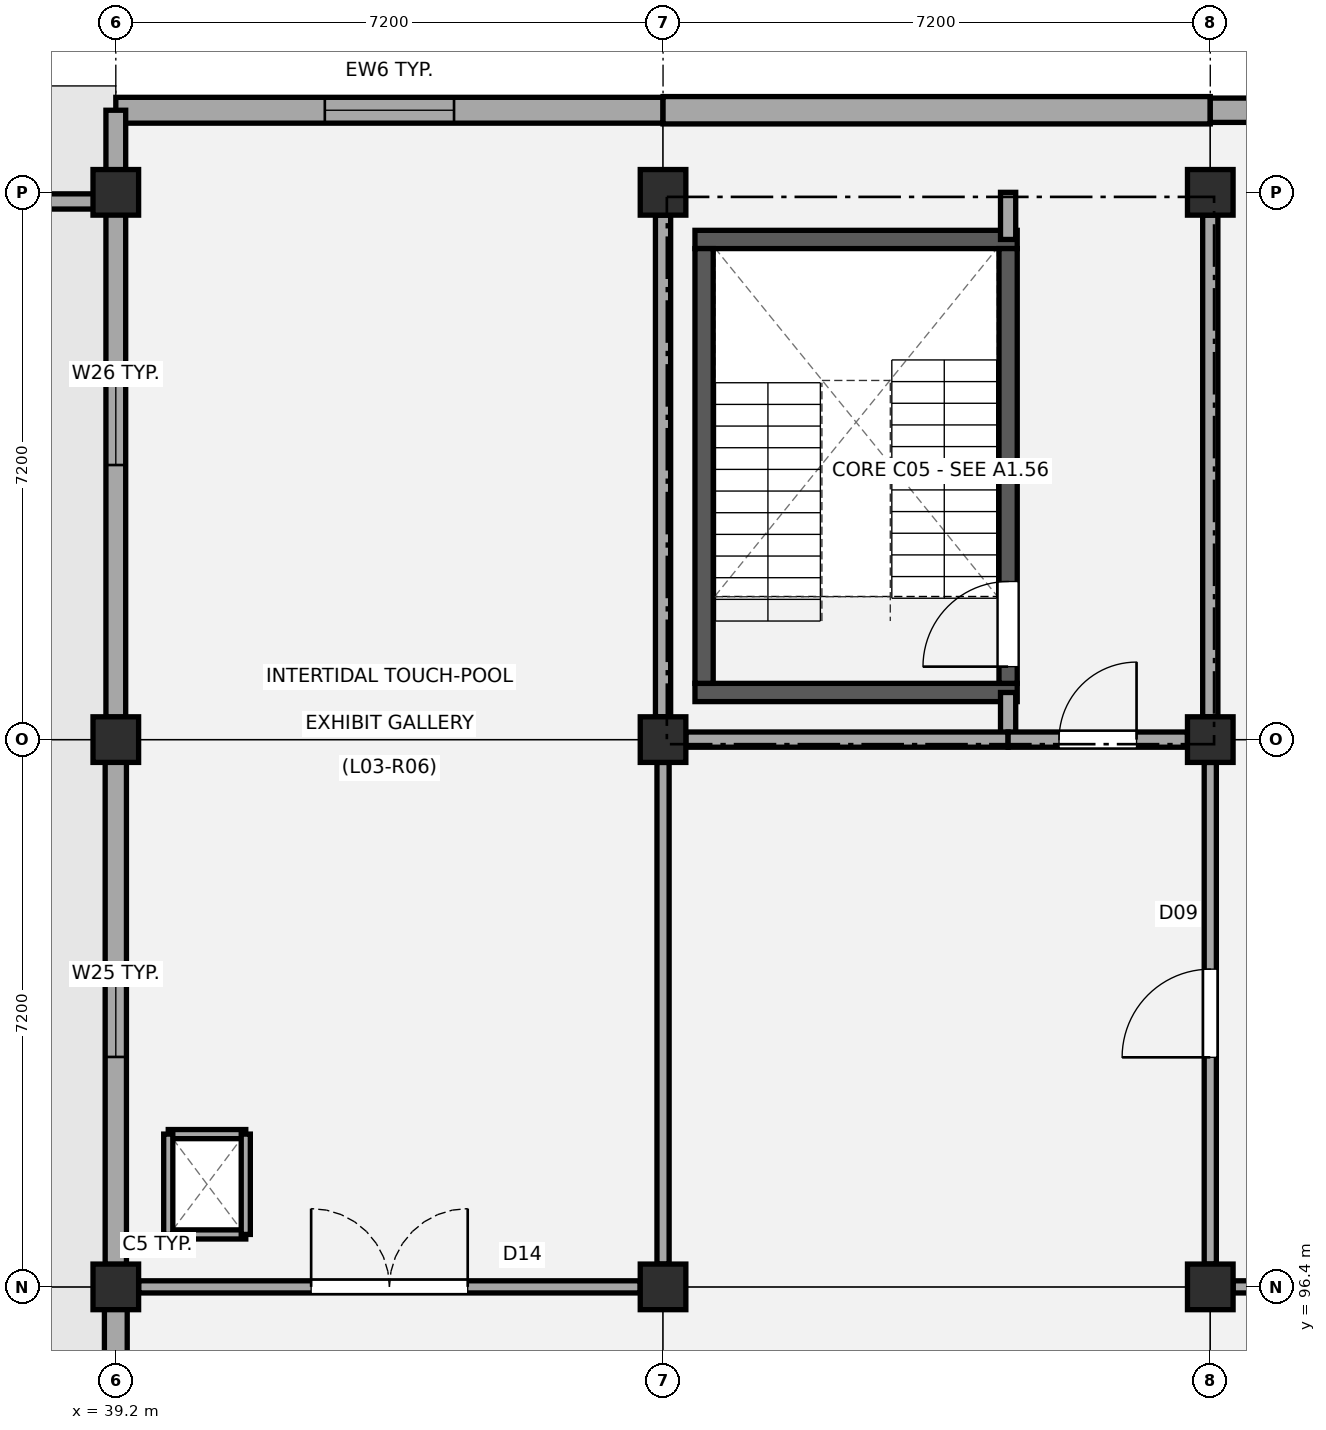
"""IFC4 building model, lengths in metres.
Left out: names, types, materials, properties, quantities, classifications, styles, units other than length and angle.
Written with IfcOpenShell. Run it as: python <this file> out.ifc"""

import sys

from ifc_helpers import new_model, si_unit, direction, frame, frame_2d, origin, origin_2d, place, context, subcontext, project, spatial, rectangle, extrude, element, fill, save


model = new_model("IFC4")
c1 = context("Model", 3, precision=1e-05, world=origin(), true_north=direction((0.0, 1.0)))
c2 = subcontext(c1, "Body", "Model", "MODEL_VIEW")
j1 = project(units=[si_unit("LENGTHUNIT", "METRE"), si_unit("PLANEANGLEUNIT", "RADIAN")], contexts=[c1])
p1 = place(None, origin())
s1 = spatial("IfcSite", under=j1, at=p1, CompositionType="ELEMENT")
p2 = place(p1, origin())
s2 = spatial("IfcBuilding", under=s1, at=p2, CompositionType="ELEMENT")
p3 = place(p2, frame((0.0, 0.0, 13.5)))
s3 = spatial("IfcBuildingStorey", under=s2, at=p3, CompositionType="ELEMENT", Elevation=13.5)
for number, where, z_axis, x_axis in (
    (1, (39.2, 96.4, 0.0), (0.0, 0.0, 1.0), (1.0, 0.0, 0.0)),
    (2, (39.2, 103.6, 0.0), (0.0, 0.0, 1.0), (1.0, 0.0, 0.0)),
    (3, (39.2, 110.8, 0.0), (0.0, 0.0, 1.0), (1.0, 0.0, 0.0)),
    (4, (46.4, 96.4, 0.0), (0.0, 0.0, 1.0), (1.0, 0.0, 0.0)),
    (5, (46.4, 103.6, 0.0), (0.0, 0.0, 1.0), (1.0, 0.0, 0.0)),
    (6, (46.4, 110.8, 0.0), (0.0, 0.0, 1.0), (1.0, 0.0, 0.0)),
    (7, (53.6, 96.4, 0.0), (0.0, 0.0, 1.0), (1.0, 0.0, 0.0)),
    (8, (53.6, 103.6, 0.0), (0.0, 0.0, 1.0), (1.0, 0.0, 0.0)),
    (9, (53.6, 110.8, 0.0), (0.0, 0.0, 1.0), (1.0, 0.0, 0.0)),
):
    element("IfcColumn", number, at=place(p3, frame(where, z_axis=z_axis, x_axis=x_axis)), inside=s3, PredefinedType="COLUMN", context=c2, shape_type="SweptSolid", body=[
        extrude(rectangle(XDim=0.6, YDim=0.6, at=origin_2d()), origin(), (0.0, 0.0, 1.0), 4.14),
    ])
p4 = place(p3, frame((39.2, 111.88, 0.0), z_axis=(0.0, 0.0, 1.0), x_axis=(1.0, 0.0, 0.0)))
e10 = element("IfcWall", 10, at=p4, inside=s3, PredefinedType="STANDARD", context=c2, shape_type="SweptSolid", body=[
    extrude(rectangle(XDim=7.2, YDim=0.34, at=frame_2d((3.6, 0.0))), origin(), (0.0, 0.0, 1.0), 3.87),
])
p5 = place(p4, frame((2.75, 0.0, 0.95)))
e11 = element("IfcOpeningElement", 11, at=p5, cuts=e10, PredefinedType="OPENING", context=c2, shape_type="SweptSolid", body=[
    extrude(rectangle(XDim=1.7, YDim=1.75, at=frame_2d((0.85, 0.875))), frame((0.0, 0.18, 0.0), z_axis=(0.0, -1.0, 0.0), x_axis=(1.0, 0.0, 0.0)), (0.0, 0.0, 1.0), 0.36),
])
p6 = place(p3, frame((46.4, 111.88, 0.0), z_axis=(0.0, 0.0, 1.0), x_axis=(1.0, 0.0, 0.0)))
e12 = element("IfcWall", 12, at=p6, inside=s3, PredefinedType="STANDARD", context=c2, shape_type="SweptSolid", body=[
    extrude(rectangle(XDim=7.2, YDim=0.36, at=frame_2d((3.6, 0.0))), origin(), (0.0, 0.0, 1.0), 3.85),
])
p7 = place(p3, frame((53.6, 111.88, 0.0), z_axis=(0.0, 0.0, 1.0), x_axis=(1.0, 0.0, 0.0)))
e13 = element("IfcWall", 13, at=p7, inside=s3, PredefinedType="STANDARD", context=c2, shape_type="SweptSolid", body=[
    extrude(rectangle(XDim=7.2, YDim=0.32, at=frame_2d((3.6, 0.0))), origin(), (0.0, 0.0, 1.0), 3.87),
])
p8 = place(p7, frame((2.6, 0.0, 0.95)))
e14 = element("IfcOpeningElement", 14, at=p8, cuts=e13, PredefinedType="OPENING", context=c2, shape_type="SweptSolid", body=[
    extrude(rectangle(XDim=2.0, YDim=1.9, at=frame_2d((1.0, 0.95))), frame((0.0, 0.17, 0.0), z_axis=(0.0, -1.0, 0.0), x_axis=(1.0, 0.0, 0.0)), (0.0, 0.0, 1.0), 0.34),
])
p9 = place(p3, frame((39.2, 89.595, 0.0), z_axis=(0.0, 0.0, 1.0), x_axis=(0.0, 1.0, 0.0)))
e15 = element("IfcWall", 15, at=p9, inside=s3, PredefinedType="STANDARD", context=c2, shape_type="SweptSolid", body=[
    extrude(rectangle(XDim=6.51, YDim=0.3, at=frame_2d((3.255, 0.0))), origin(), (0.0, 0.0, 1.0), 3.32),
])
p10 = place(p9, frame((1.455, 0.0, 0.95)))
e16 = element("IfcOpeningElement", 16, at=p10, cuts=e15, PredefinedType="OPENING", context=c2, shape_type="SweptSolid", body=[
    extrude(rectangle(XDim=3.6, YDim=2.05, at=frame_2d((1.8, 1.025))), frame((0.0, 0.16, 0.0), z_axis=(0.0, -1.0, 0.0), x_axis=(1.0, 0.0, 0.0)), (0.0, 0.0, 1.0), 0.32),
])
p11 = place(p3, frame((39.2, 96.695, 0.0), z_axis=(0.0, 0.0, 1.0), x_axis=(0.0, 1.0, 0.0)))
e17 = element("IfcWall", 17, at=p11, inside=s3, PredefinedType="STANDARD", context=c2, shape_type="SweptSolid", body=[
    extrude(rectangle(XDim=6.61, YDim=0.28, at=frame_2d((3.305, 0.0))), origin(), (0.0, 0.0, 1.0), 3.32),
])
p12 = place(p11, frame((2.73, 0.0, 0.95)))
e18 = element("IfcOpeningElement", 18, at=p12, cuts=e17, PredefinedType="OPENING", context=c2, shape_type="SweptSolid", body=[
    extrude(rectangle(XDim=1.15, YDim=1.15, at=frame_2d((0.575, 0.575))), frame((0.0, 0.15, 0.0), z_axis=(0.0, -1.0, 0.0), x_axis=(1.0, 0.0, 0.0)), (0.0, 0.0, 1.0), 0.3),
])
p13 = place(p3, frame((39.2, 103.895, 0.0), z_axis=(0.0, 0.0, 1.0), x_axis=(0.0, 1.0, 0.0)))
e19 = element("IfcWall", 19, at=p13, inside=s3, PredefinedType="STANDARD", context=c2, shape_type="SweptSolid", body=[
    extrude(rectangle(XDim=7.985, YDim=0.26, at=frame_2d((3.992, 0.0))), origin(), (0.0, 0.0, 1.0), 3.32),
])
p14 = place(p13, frame((3.317, 0.0, 0.95)))
e20 = element("IfcOpeningElement", 20, at=p14, cuts=e19, PredefinedType="OPENING", context=c2, shape_type="SweptSolid", body=[
    extrude(rectangle(XDim=1.35, YDim=1.2, at=frame_2d((0.675, 0.6))), frame((0.0, 0.14, 0.0), z_axis=(0.0, -1.0, 0.0), x_axis=(1.0, 0.0, 0.0)), (0.0, 0.0, 1.0), 0.28),
])
p15 = place(p3, frame((32.0, 110.68, 0.0), z_axis=(0.0, 0.0, 1.0), x_axis=(1.0, 0.0, 0.0)))
e21 = element("IfcWall", 21, at=p15, inside=s3, PredefinedType="PARAPET", context=c2, shape_type="SweptSolid", body=[
    extrude(rectangle(XDim=7.2, YDim=0.2, at=frame_2d((3.6, 0.0))), origin(), (0.0, 0.0, 1.0), 0.72),
])
for number, where, z_axis, x_axis in (
    (22, (46.82, 104.22, 0.0), (0.0, 0.0, 1.0), (1.0, 0.0, 0.0)),
    (23, (46.82, 110.18, 0.0), (0.0, 0.0, 1.0), (1.0, 0.0, 0.0)),
):
    element("IfcWall", number, at=place(p3, frame(where, z_axis=z_axis, x_axis=x_axis)), inside=s3, PredefinedType="SHEAR", context=c2, shape_type="SweptSolid", body=[
        extrude(rectangle(XDim=4.24, YDim=0.24, at=frame_2d((2.12, 0.0))), origin(), (0.0, 0.0, 1.0), 3.86),
    ])
p16 = place(p3, frame((46.94, 104.34, 0.0), z_axis=(0.0, 0.0, 1.0), x_axis=(0.0, 1.0, 0.0)))
e24 = element("IfcWall", 24, at=p16, inside=s3, PredefinedType="SHEAR", context=c2, shape_type="SweptSolid", body=[
    extrude(rectangle(XDim=5.72, YDim=0.24, at=frame_2d((2.86, 0.0))), origin(), (0.0, 0.0, 1.0), 3.86),
])
p17 = place(p3, frame((50.94, 104.34, 0.0), z_axis=(0.0, 0.0, 1.0), x_axis=(0.0, 1.0, 0.0)))
e25 = element("IfcWall", 25, at=p17, inside=s3, PredefinedType="SHEAR", context=c2, shape_type="SweptSolid", body=[
    extrude(rectangle(XDim=5.72, YDim=0.24, at=frame_2d((2.86, 0.0))), origin(), (0.0, 0.0, 1.0), 3.86),
])
p18 = place(p17, frame((0.22, 0.0, 0.0)))
e26 = element("IfcOpeningElement", 26, at=p18, cuts=e25, PredefinedType="OPENING", context=c2, shape_type="SweptSolid", body=[
    extrude(rectangle(XDim=1.12, YDim=2.15, at=frame_2d((0.56, 1.075))), frame((0.0, 0.13, 0.0), z_axis=(0.0, -1.0, 0.0), x_axis=(1.0, 0.0, 0.0)), (0.0, 0.0, 1.0), 0.26),
])
p19 = place(p3, frame((50.94, 103.6, 0.0), z_axis=(0.0, 0.0, 1.0), x_axis=(0.0, 1.0, 0.0)))
e27 = element("IfcWall", 27, at=p19, inside=s3, PredefinedType="PARTITIONING", context=c2, shape_type="SweptSolid", body=[
    extrude(rectangle(XDim=0.62, YDim=0.2, at=frame_2d((0.31, 0.0))), origin(), (0.0, 0.0, 1.0), 3.2),
])
p20 = place(p3, frame((50.94, 110.18, 0.0), z_axis=(0.0, 0.0, 1.0), x_axis=(0.0, 1.0, 0.0)))
e28 = element("IfcWall", 28, at=p20, inside=s3, PredefinedType="PARTITIONING", context=c2, shape_type="SweptSolid", body=[
    extrude(rectangle(XDim=0.62, YDim=0.2, at=frame_2d((0.31, 0.0))), origin(), (0.0, 0.0, 1.0), 3.3),
])
for number, where, z_axis, x_axis in (
    (29, (46.4, 103.9, 0.0), (0.0, 0.0, 1.0), (0.0, 1.0, 0.0)),
    (30, (53.6, 103.9, 0.0), (0.0, 0.0, 1.0), (0.0, 1.0, 0.0)),
):
    element("IfcWall", number, at=place(p3, frame(where, z_axis=z_axis, x_axis=x_axis)), inside=s3, PredefinedType="PARTITIONING", context=c2, shape_type="SweptSolid", body=[
        extrude(rectangle(XDim=6.6, YDim=0.2, at=frame_2d((3.3, 0.0))), origin(), (0.0, 0.0, 1.0), 3.2),
    ])
p21 = place(p3, frame((46.7, 103.6, 0.0), z_axis=(0.0, 0.0, 1.0), x_axis=(1.0, 0.0, 0.0)))
e31 = element("IfcWall", 31, at=p21, inside=s3, PredefinedType="PARTITIONING", context=c2, shape_type="SweptSolid", body=[
    extrude(rectangle(XDim=4.24, YDim=0.2, at=frame_2d((2.12, 0.0))), origin(), (0.0, 0.0, 1.0), 3.2),
])
p22 = place(p3, frame((50.94, 103.6, 0.0), z_axis=(0.0, 0.0, 1.0), x_axis=(1.0, 0.0, 0.0)))
e32 = element("IfcWall", 32, at=p22, inside=s3, PredefinedType="PARTITIONING", context=c2, shape_type="SweptSolid", body=[
    extrude(rectangle(XDim=2.36, YDim=0.2, at=frame_2d((1.18, 0.0))), origin(), (0.0, 0.0, 1.0), 3.2),
])
p23 = place(p22, frame((0.67, 0.0, 0.0)))
e33 = element("IfcOpeningElement", 33, at=p23, cuts=e32, PredefinedType="OPENING", context=c2, shape_type="SweptSolid", body=[
    extrude(rectangle(XDim=1.02, YDim=2.15, at=frame_2d((0.51, 1.075))), frame((0.0, 0.11, 0.0), z_axis=(0.0, -1.0, 0.0), x_axis=(1.0, 0.0, 0.0)), (0.0, 0.0, 1.0), 0.22),
])
for number, where, z_axis, x_axis in (
    (34, (39.89, 97.09, 0.0), (0.0, 0.0, 1.0), (1.0, 0.0, 0.0)),
    (35, (39.89, 98.41, 0.0), (0.0, 0.0, 1.0), (1.0, 0.0, 0.0)),
):
    element("IfcWall", number, at=place(p3, frame(where, z_axis=z_axis, x_axis=x_axis)), inside=s3, PredefinedType="PARTITIONING", context=c2, shape_type="SweptSolid", body=[
        extrude(rectangle(XDim=1.02, YDim=0.12, at=frame_2d((0.51, 0.0))), origin(), (0.0, 0.0, 1.0), 3.86),
    ])
for number, where, z_axis, x_axis in (
    (36, (39.89, 97.09, 0.0), (0.0, 0.0, 1.0), (0.0, 1.0, 0.0)),
    (37, (40.91, 97.09, 0.0), (0.0, 0.0, 1.0), (0.0, 1.0, 0.0)),
):
    element("IfcWall", number, at=place(p3, frame(where, z_axis=z_axis, x_axis=x_axis)), inside=s3, PredefinedType="PARTITIONING", context=c2, shape_type="SweptSolid", body=[
        extrude(rectangle(XDim=1.32, YDim=0.12, at=frame_2d((0.66, 0.0))), origin(), (0.0, 0.0, 1.0), 3.86),
    ])
p24 = place(p3, frame((39.5, 96.4, 0.0), z_axis=(0.0, 0.0, 1.0), x_axis=(1.0, 0.0, 0.0)))
e38 = element("IfcWall", 38, at=p24, inside=s3, PredefinedType="PARTITIONING", context=c2, shape_type="SweptSolid", body=[
    extrude(rectangle(XDim=6.6, YDim=0.16, at=frame_2d((3.3, 0.0))), origin(), (0.0, 0.0, 1.0), 3.22),
])
p25 = place(p24, frame((2.27, 0.0, 0.0)))
e39 = element("IfcOpeningElement", 39, at=p25, cuts=e38, PredefinedType="OPENING", context=c2, shape_type="SweptSolid", body=[
    extrude(rectangle(XDim=2.06, YDim=2.28, at=frame_2d((1.03, 1.14))), frame((0.0, 0.09, 0.0), z_axis=(0.0, -1.0, 0.0), x_axis=(1.0, 0.0, 0.0)), (0.0, 0.0, 1.0), 0.18),
])
p26 = place(p3, frame((46.4, 96.7, 0.0), z_axis=(0.0, 0.0, 1.0), x_axis=(0.0, 1.0, 0.0)))
e40 = element("IfcWall", 40, at=p26, inside=s3, PredefinedType="PARTITIONING", context=c2, shape_type="SweptSolid", body=[
    extrude(rectangle(XDim=6.6, YDim=0.16, at=frame_2d((3.3, 0.0))), origin(), (0.0, 0.0, 1.0), 3.25),
])
p27 = place(p3, frame((53.6, 96.7, 0.0), z_axis=(0.0, 0.0, 1.0), x_axis=(0.0, 1.0, 0.0)))
e41 = element("IfcWall", 41, at=p27, inside=s3, PredefinedType="PARTITIONING", context=c2, shape_type="SweptSolid", body=[
    extrude(rectangle(XDim=6.6, YDim=0.16, at=frame_2d((3.3, 0.0))), origin(), (0.0, 0.0, 1.0), 3.25),
])
p28 = place(p27, frame((2.72, 0.0, 0.0)))
e42 = element("IfcOpeningElement", 42, at=p28, cuts=e41, PredefinedType="OPENING", context=c2, shape_type="SweptSolid", body=[
    extrude(rectangle(XDim=1.16, YDim=2.18, at=frame_2d((0.58, 1.09))), frame((0.0, 0.09, 0.0), z_axis=(0.0, -1.0, 0.0), x_axis=(1.0, 0.0, 0.0)), (0.0, 0.0, 1.0), 0.18),
])
p29 = place(p3, frame((53.9, 96.4, 0.0), z_axis=(0.0, 0.0, 1.0), x_axis=(1.0, 0.0, 0.0)))
e43 = element("IfcWall", 43, at=p29, inside=s3, PredefinedType="PARTITIONING", context=c2, shape_type="SweptSolid", body=[
    extrude(rectangle(XDim=6.6, YDim=0.16, at=frame_2d((3.3, 0.0))), origin(), (0.0, 0.0, 1.0), 3.22),
])
p30 = place(p5, origin())
e44 = element("IfcWindow", 44, at=p30, inside=s3, PartitioningType="SINGLE_PANEL", PredefinedType="WINDOW", context=c2, shape_type="SweptSolid", body=[
    extrude(rectangle(XDim=1.7, YDim=1.75, at=frame_2d((0.85, 0.875))), frame((0.0, 0.03, 0.0), z_axis=(0.0, -1.0, 0.0), x_axis=(1.0, 0.0, 0.0)), (0.0, 0.0, 1.0), 0.06),
])
fill(e11, e44)
p31 = place(p12, origin())
e45 = element("IfcWindow", 45, at=p31, inside=s3, PartitioningType="SINGLE_PANEL", PredefinedType="WINDOW", context=c2, shape_type="SweptSolid", body=[
    extrude(rectangle(XDim=1.15, YDim=1.15, at=frame_2d((0.575, 0.575))), frame((0.0, 0.03, 0.0), z_axis=(0.0, -1.0, 0.0), x_axis=(1.0, 0.0, 0.0)), (0.0, 0.0, 1.0), 0.06),
])
fill(e18, e45)
p32 = place(p14, origin())
e46 = element("IfcWindow", 46, at=p32, inside=s3, PartitioningType="SINGLE_PANEL", PredefinedType="WINDOW", context=c2, shape_type="SweptSolid", body=[
    extrude(rectangle(XDim=1.35, YDim=1.2, at=frame_2d((0.675, 0.6))), frame((0.0, 0.03, 0.0), z_axis=(0.0, -1.0, 0.0), x_axis=(1.0, 0.0, 0.0)), (0.0, 0.0, 1.0), 0.06),
])
fill(e20, e46)
p33 = place(p18, origin())
e47 = element("IfcDoor", 47, at=p33, inside=s3, OperationType="SINGLE_SWING_LEFT", PredefinedType="DOOR", context=c2, shape_type="SweptSolid", body=[
    extrude(rectangle(XDim=1.12, YDim=2.15, at=frame_2d((0.56, 1.075))), frame((0.0, 0.025, 0.0), z_axis=(0.0, -1.0, 0.0), x_axis=(1.0, 0.0, 0.0)), (0.0, 0.0, 1.0), 0.05),
])
fill(e26, e47)
p34 = place(p23, origin())
e48 = element("IfcDoor", 48, at=p34, inside=s3, OperationType="SINGLE_SWING_RIGHT", PredefinedType="DOOR", context=c2, shape_type="SweptSolid", body=[
    extrude(rectangle(XDim=1.02, YDim=2.15, at=frame_2d((0.51, 1.075))), frame((0.0, 0.025, 0.0), z_axis=(0.0, -1.0, 0.0), x_axis=(1.0, 0.0, 0.0)), (0.0, 0.0, 1.0), 0.05),
])
fill(e33, e48)
p35 = place(p25, origin())
e49 = element("IfcDoor", 49, at=p35, inside=s3, OperationType="DOUBLE_DOOR_SINGLE_SWING", PredefinedType="DOOR", context=c2, shape_type="SweptSolid", body=[
    extrude(rectangle(XDim=2.06, YDim=2.28, at=frame_2d((1.03, 1.14))), frame((0.0, 0.025, 0.0), z_axis=(0.0, -1.0, 0.0), x_axis=(1.0, 0.0, 0.0)), (0.0, 0.0, 1.0), 0.05),
])
fill(e39, e49)
p36 = place(p28, origin())
e50 = element("IfcDoor", 50, at=p36, inside=s3, OperationType="SINGLE_SWING_LEFT", PredefinedType="DOOR", context=c2, shape_type="SweptSolid", body=[
    extrude(rectangle(XDim=1.16, YDim=2.18, at=frame_2d((0.58, 1.09))), frame((0.0, 0.025, 0.0), z_axis=(0.0, -1.0, 0.0), x_axis=(1.0, 0.0, 0.0)), (0.0, 0.0, 1.0), 0.05),
])
fill(e42, e50)
save(model, sys.argv[1])
